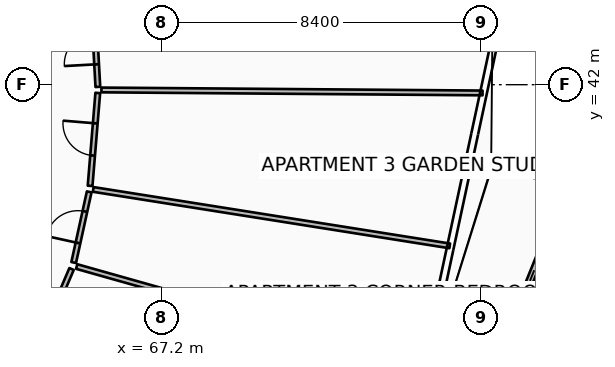
"""IFC4 building model, lengths in metres.
Left out: names, types, materials, properties, quantities, classifications, styles, units other than length and angle.
Written with IfcOpenShell. Run it as: python <this file> out.ifc"""

import sys

from ifc_helpers import new_model, si_unit, direction, frame, frame_2d, origin, place, context, subcontext, project, spatial, polyline, rectangle, outline, extrude, element, fill, save


model = new_model("IFC4")
c1 = context("Model", 3, precision=1e-05, world=origin(), true_north=direction((0.0, 1.0)))
c2 = subcontext(c1, "Body", "Model", "MODEL_VIEW")
j1 = project(units=[si_unit("LENGTHUNIT", "METRE"), si_unit("PLANEANGLEUNIT", "RADIAN")], contexts=[c1])
p1 = place(None, origin())
s1 = spatial("IfcSite", under=j1, at=p1, CompositionType="ELEMENT")
p2 = place(p1, origin())
s2 = spatial("IfcBuilding", under=s1, at=p2, CompositionType="ELEMENT")
p3 = place(p2, frame((0.0, 0.0, 187.8)))
s3 = spatial("IfcBuildingStorey", under=s2, at=p3, CompositionType="ELEMENT", Elevation=187.8)
p4 = place(p3, frame((73.725, 29.027, 0.0), z_axis=(0.0, 0.0, 1.0), x_axis=(0.375821400088, 0.926692114586, 0.0)))
e1 = element("IfcWall", 1, at=p4, inside=s3, PredefinedType="PARAPET", context=c2, shape_type="SweptSolid", body=[
    extrude(outline(polyline([(0.0, 0.0), (11.257, 0.0), (11.257, 1.497), (5.628, 1.696), (0.0, 1.832), (0.0, 0.0)])), frame((0.0, 0.09, 0.0), z_axis=(0.0, -1.0, 0.0), x_axis=(1.0, 0.0, 0.0)), (0.0, 0.0, 1.0), 0.18),
])
p5 = place(p3, frame((63.142, 33.193, 0.0), z_axis=(0.0, 0.0, 1.0), x_axis=(0.392302335844, 0.919836331796, 0.0)))
e2 = element("IfcWall", 2, at=p5, inside=s3, PredefinedType="PARTITIONING", context=c2, shape_type="SweptSolid", body=[
    extrude(rectangle(XDim=4.302, YDim=0.125, at=frame_2d((2.151, 0.0))), origin(), (0.0, 0.0, 1.0), 2.94),
])
p6 = place(p5, frame((1.701, 0.0, 0.0)))
e3 = element("IfcOpeningElement", 3, at=p6, cuts=e2, PredefinedType="OPENING", context=c2, shape_type="SweptSolid", body=[
    extrude(rectangle(XDim=0.9, YDim=2.08, at=frame_2d((0.45, 1.04))), frame((0.0, 0.073, 0.0), z_axis=(0.0, -1.0, 0.0), x_axis=(1.0, 0.0, 0.0)), (0.0, 0.0, 1.0), 0.145),
])
p7 = place(p3, frame((64.965, 37.215, 0.0), z_axis=(0.0, 0.0, 1.0), x_axis=(0.962454024137, -0.271444748378, 0.0)))
e4 = element("IfcWall", 4, at=p7, inside=s3, PredefinedType="PARTITIONING", context=c2, shape_type="SweptSolid", body=[
    extrude(rectangle(XDim=9.403, YDim=0.125, at=frame_2d((4.702, 0.0))), origin(), (0.0, 0.0, 1.0), 2.94),
])
p8 = place(p3, frame((65.4, 39.244, 0.0), z_axis=(0.0, 0.0, 1.0), x_axis=(0.987688031288, -0.156436417916, 0.0)))
e5 = element("IfcWall", 5, at=p8, inside=s3, PredefinedType="PARTITIONING", context=c2, shape_type="SweptSolid", body=[
    extrude(rectangle(XDim=9.498, YDim=0.125, at=frame_2d((4.749, 0.0))), origin(), (0.0, 0.0, 1.0), 2.94),
])
p9 = place(p3, frame((65.616, 41.862, 0.0), z_axis=(0.0, 0.0, 1.0), x_axis=(0.999969275456, -0.007838886617, 0.0)))
e6 = element("IfcWall", 6, at=p9, inside=s3, PredefinedType="PARTITIONING", context=c2, shape_type="SweptSolid", body=[
    extrude(rectangle(XDim=10.029, YDim=0.125, at=frame_2d((5.014, 0.0))), origin(), (0.0, 0.0, 1.0), 2.94),
])
p10 = place(p3, frame((64.886, 37.321, 0.0), z_axis=(0.0, 0.0, 1.0), x_axis=(0.214404311004, 0.976744998156, 0.0)))
e7 = element("IfcWall", 7, at=p10, inside=s3, PredefinedType="PARTITIONING", context=c2, shape_type="SweptSolid", body=[
    extrude(rectangle(XDim=1.904, YDim=0.125, at=frame_2d((0.952, 0.0))), origin(), (0.0, 0.0, 1.0), 2.94),
])
p11 = place(p10, frame((0.527, 0.0, 0.0)))
e8 = element("IfcOpeningElement", 8, at=p11, cuts=e7, PredefinedType="OPENING", context=c2, shape_type="SweptSolid", body=[
    extrude(rectangle(XDim=0.85, YDim=2.06, at=frame_2d((0.425, 1.03))), frame((0.0, 0.073, 0.0), z_axis=(0.0, -1.0, 0.0), x_axis=(1.0, 0.0, 0.0)), (0.0, 0.0, 1.0), 0.145),
])
p12 = place(p3, frame((65.318, 39.338, 0.0), z_axis=(0.0, 0.0, 1.0), x_axis=(0.082403040097, 0.996599086385, 0.0)))
e9 = element("IfcWall", 9, at=p12, inside=s3, PredefinedType="PARTITIONING", context=c2, shape_type="SweptSolid", body=[
    extrude(rectangle(XDim=2.453, YDim=0.125, at=frame_2d((1.227, 0.0))), origin(), (0.0, 0.0, 1.0), 2.94),
])
p13 = place(p12, frame((0.802, 0.0, 0.0)))
e10 = element("IfcOpeningElement", 10, at=p13, cuts=e9, PredefinedType="OPENING", context=c2, shape_type="SweptSolid", body=[
    extrude(rectangle(XDim=0.85, YDim=2.06, at=frame_2d((0.425, 1.03))), frame((0.0, 0.073, 0.0), z_axis=(0.0, -1.0, 0.0), x_axis=(1.0, 0.0, 0.0)), (0.0, 0.0, 1.0), 0.145),
])
p14 = place(p3, frame((65.522, 41.942, 0.0), z_axis=(0.0, 0.0, 1.0), x_axis=(-0.055019552889, 0.998485277207, 0.0)))
e11 = element("IfcWall", 11, at=p14, inside=s3, PredefinedType="PARTITIONING", context=c2, shape_type="SweptSolid", body=[
    extrude(rectangle(XDim=2.041, YDim=0.125, at=frame_2d((1.021, 0.0))), origin(), (0.0, 0.0, 1.0), 2.94),
])
p15 = place(p14, frame((0.595, 0.0, 0.0)))
e12 = element("IfcOpeningElement", 12, at=p15, cuts=e11, PredefinedType="OPENING", context=c2, shape_type="SweptSolid", body=[
    extrude(rectangle(XDim=0.85, YDim=2.06, at=frame_2d((0.425, 1.03))), frame((0.0, 0.073, 0.0), z_axis=(0.0, -1.0, 0.0), x_axis=(1.0, 0.0, 0.0)), (0.0, 0.0, 1.0), 0.145),
])
p16 = place(p11, origin())
e13 = element("IfcDoor", 13, at=p16, inside=s3, OperationType="SINGLE_SWING_LEFT", PredefinedType="DOOR", context=c2, shape_type="SweptSolid", body=[
    extrude(rectangle(XDim=0.85, YDim=2.06, at=frame_2d((0.425, 1.03))), frame((0.0, 0.025, 0.0), z_axis=(0.0, -1.0, 0.0), x_axis=(1.0, 0.0, 0.0)), (0.0, 0.0, 1.0), 0.05),
])
fill(e8, e13)
p17 = place(p13, origin())
e14 = element("IfcDoor", 14, at=p17, inside=s3, OperationType="SINGLE_SWING_RIGHT", PredefinedType="DOOR", context=c2, shape_type="SweptSolid", body=[
    extrude(rectangle(XDim=0.85, YDim=2.06, at=frame_2d((0.425, 1.03))), frame((0.0, 0.025, 0.0), z_axis=(0.0, -1.0, 0.0), x_axis=(1.0, 0.0, 0.0)), (0.0, 0.0, 1.0), 0.05),
])
fill(e10, e14)
p18 = place(p15, origin())
e15 = element("IfcDoor", 15, at=p18, inside=s3, OperationType="SINGLE_SWING_LEFT", PredefinedType="DOOR", context=c2, shape_type="SweptSolid", body=[
    extrude(rectangle(XDim=0.85, YDim=2.06, at=frame_2d((0.425, 1.03))), frame((0.0, 0.025, 0.0), z_axis=(0.0, -1.0, 0.0), x_axis=(1.0, 0.0, 0.0)), (0.0, 0.0, 1.0), 0.05),
])
fill(e12, e15)
save(model, sys.argv[1])
